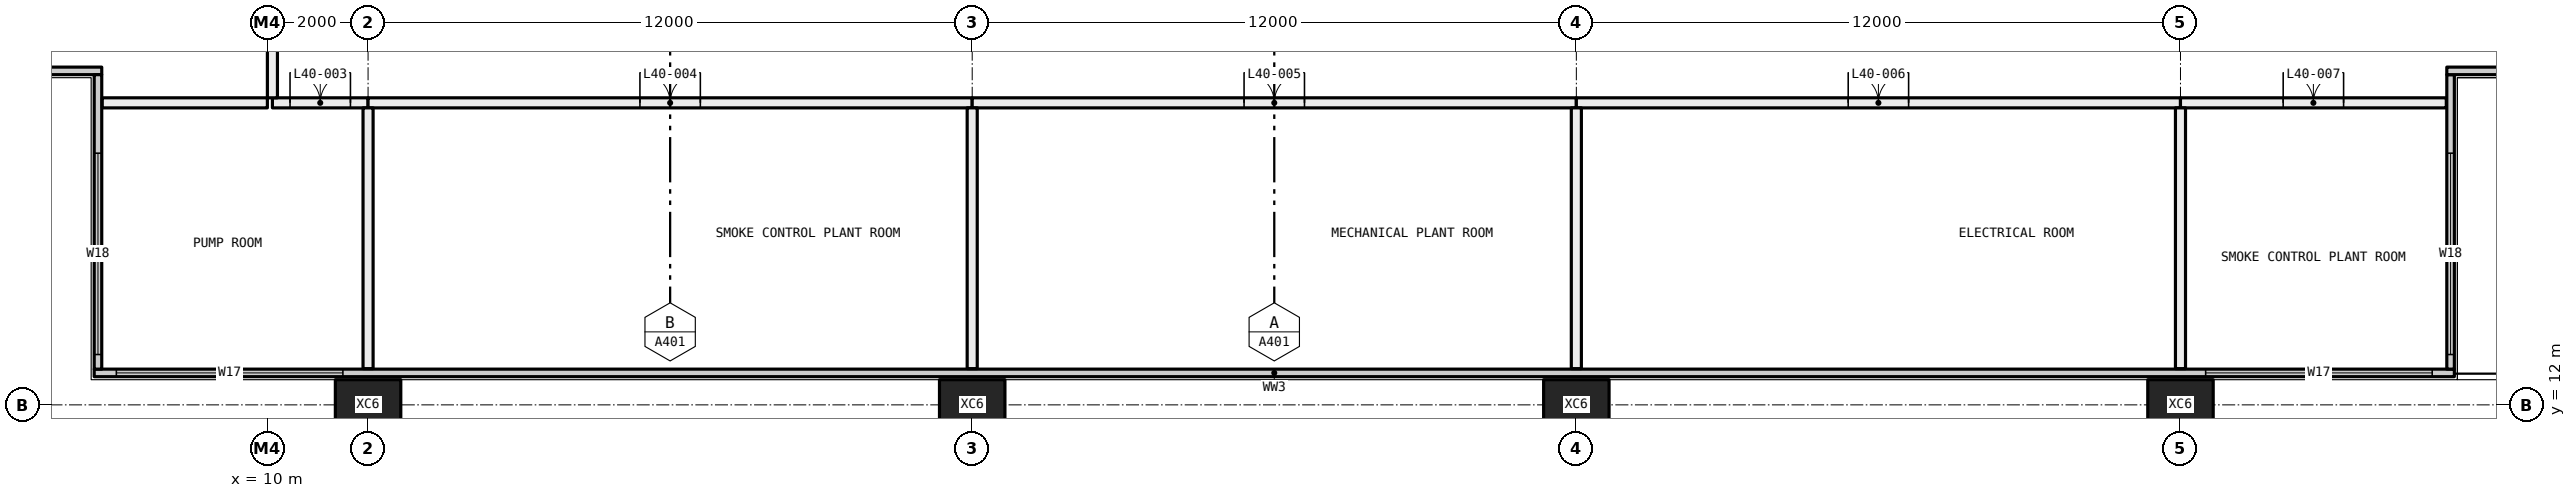
"""IFC4 building model, lengths in metres.
Left out: names, types, materials, properties, quantities, classifications, styles, units other than length and angle.
Written with IfcOpenShell. Run it as: python <this file> out.ifc"""

import sys

from ifc_helpers import new_model, si_unit, direction, frame, frame_2d, origin, origin_2d, place, context, subcontext, project, spatial, rectangle, hollow_rectangle, extrude, element, fill, save


model = new_model("IFC4")
c1 = context("Model", 3, precision=1e-05, world=origin(), true_north=direction((0.0, 1.0)))
c2 = subcontext(c1, "Body", "Model", "MODEL_VIEW")
j1 = project(units=[si_unit("LENGTHUNIT", "METRE"), si_unit("PLANEANGLEUNIT", "RADIAN")], contexts=[c1])
p1 = place(None, origin())
s1 = spatial("IfcSite", under=j1, at=p1, CompositionType="ELEMENT")
p2 = place(p1, origin())
s2 = spatial("IfcBuilding", under=s1, at=p2, CompositionType="ELEMENT")
p3 = place(p2, frame((0.0, 0.0, 153.75)))
s3 = spatial("IfcBuildingStorey", under=s2, at=p3, CompositionType="ELEMENT", Elevation=153.75)
for number, where, z_axis, x_axis in (
    (1, (12.0, 12.0, -0.4), (0.0, 0.0, 1.0), (1.0, 0.0, 0.0)),
    (2, (24.0, 12.0, -0.4), (0.0, 0.0, 1.0), (1.0, 0.0, 0.0)),
    (3, (36.0, 12.0, -0.4), (0.0, 0.0, 1.0), (1.0, 0.0, 0.0)),
    (4, (48.0, 12.0, -0.4), (0.0, 0.0, 1.0), (1.0, 0.0, 0.0)),
):
    element("IfcColumn", number, at=place(p3, frame(where, z_axis=z_axis, x_axis=x_axis)), inside=s3, PredefinedType="COLUMN", context=c2, shape_type="SweptSolid", body=[
        extrude(hollow_rectangle(XDim=1.3, YDim=1.0, WallThickness=0.05, at=origin_2d()), origin(), (0.0, 0.0, 1.0), 4.5),
    ])
p4 = place(p3, frame((6.56, 12.635, 0.0), z_axis=(0.0, 0.0, 1.0), x_axis=(1.0, 0.0, 0.0)))
e5 = element("IfcWall", 5, at=p4, inside=s3, PredefinedType="ELEMENTEDWALL", context=c2, shape_type="SweptSolid", body=[
    extrude(rectangle(XDim=46.88, YDim=0.15, at=frame_2d((23.44, 0.0))), origin(), (0.0, 0.0, 1.0), 4.1),
])
p5 = place(p4, frame((0.44, 0.0, 0.45)))
e6 = element("IfcOpeningElement", 6, at=p5, cuts=e5, PredefinedType="OPENING", context=c2, shape_type="SweptSolid", body=[
    extrude(rectangle(XDim=4.5, YDim=3.6, at=frame_2d((2.25, 1.8))), frame((0.0, 0.085, 0.0), z_axis=(0.0, -1.0, 0.0), x_axis=(1.0, 0.0, 0.0)), (0.0, 0.0, 1.0), 0.17),
])
p6 = place(p4, frame((41.94, 0.0, 0.45)))
e7 = element("IfcOpeningElement", 7, at=p6, cuts=e5, PredefinedType="OPENING", context=c2, shape_type="SweptSolid", body=[
    extrude(rectangle(XDim=4.5, YDim=3.6, at=frame_2d((2.25, 1.8))), frame((0.0, 0.085, 0.0), z_axis=(0.0, -1.0, 0.0), x_axis=(1.0, 0.0, 0.0)), (0.0, 0.0, 1.0), 0.17),
])
p7 = place(p3, frame((53.365, 12.71, 0.0), z_axis=(0.0, 0.0, 1.0), x_axis=(0.0, 1.0, 0.0)))
e8 = element("IfcWall", 8, at=p7, inside=s3, PredefinedType="ELEMENTEDWALL", context=c2, shape_type="SweptSolid", body=[
    extrude(rectangle(XDim=5.85, YDim=0.15, at=frame_2d((2.925, 0.0))), origin(), (0.0, 0.0, 1.0), 4.1),
])
p8 = place(p7, frame((0.29, 0.0, 0.45)))
e9 = element("IfcOpeningElement", 9, at=p8, cuts=e8, PredefinedType="OPENING", context=c2, shape_type="SweptSolid", body=[
    extrude(rectangle(XDim=4.0, YDim=3.6, at=frame_2d((2.0, 1.8))), frame((0.0, 0.085, 0.0), z_axis=(0.0, -1.0, 0.0), x_axis=(1.0, 0.0, 0.0)), (0.0, 0.0, 1.0), 0.17),
])
p9 = place(p3, frame((53.29, 18.635, 0.0), z_axis=(0.0, 0.0, 1.0), x_axis=(1.0, 0.0, 0.0)))
e10 = element("IfcWall", 10, at=p9, inside=s3, PredefinedType="ELEMENTEDWALL", context=c2, shape_type="SweptSolid", body=[
    extrude(rectangle(XDim=6.15, YDim=0.15, at=frame_2d((3.075, 0.0))), origin(), (0.0, 0.0, 1.0), 4.1),
])
p10 = place(p9, frame((1.71, 0.0, 0.45)))
e11 = element("IfcOpeningElement", 11, at=p10, cuts=e10, PredefinedType="OPENING", context=c2, shape_type="SweptSolid", body=[
    extrude(rectangle(XDim=0.9, YDim=3.6, at=frame_2d((0.45, 1.8))), frame((0.0, 0.085, 0.0), z_axis=(0.0, -1.0, 0.0), x_axis=(1.0, 0.0, 0.0)), (0.0, 0.0, 1.0), 0.17),
])
p11 = place(p9, frame((4.81, 0.0, 0.45)))
e12 = element("IfcOpeningElement", 12, at=p11, cuts=e10, PredefinedType="OPENING", context=c2, shape_type="SweptSolid", body=[
    extrude(rectangle(XDim=0.9, YDim=3.6, at=frame_2d((0.45, 1.8))), frame((0.0, 0.085, 0.0), z_axis=(0.0, -1.0, 0.0), x_axis=(1.0, 0.0, 0.0)), (0.0, 0.0, 1.0), 0.17),
])
p12 = place(p9, frame((2.81, 0.0, 0.0)))
e13 = element("IfcOpeningElement", 13, at=p12, cuts=e10, PredefinedType="OPENING", context=c2, shape_type="SweptSolid", body=[
    extrude(rectangle(XDim=1.8, YDim=2.4, at=frame_2d((0.9, 1.2))), frame((0.0, 0.085, 0.0), z_axis=(0.0, -1.0, 0.0), x_axis=(1.0, 0.0, 0.0)), (0.0, 0.0, 1.0), 0.17),
])
p13 = place(p3, frame((0.56, 18.635, 0.0), z_axis=(0.0, 0.0, 1.0), x_axis=(1.0, 0.0, 0.0)))
e14 = element("IfcWall", 14, at=p13, inside=s3, PredefinedType="ELEMENTEDWALL", context=c2, shape_type="SweptSolid", body=[
    extrude(rectangle(XDim=6.15, YDim=0.15, at=frame_2d((3.075, 0.0))), origin(), (0.0, 0.0, 1.0), 4.1),
])
p14 = place(p13, frame((0.44, 0.0, 0.45)))
e15 = element("IfcOpeningElement", 15, at=p14, cuts=e14, PredefinedType="OPENING", context=c2, shape_type="SweptSolid", body=[
    extrude(rectangle(XDim=4.0, YDim=3.6, at=frame_2d((2.0, 1.8))), frame((0.0, 0.085, 0.0), z_axis=(0.0, -1.0, 0.0), x_axis=(1.0, 0.0, 0.0)), (0.0, 0.0, 1.0), 0.17),
])
p15 = place(p3, frame((6.635, 12.71, 0.0), z_axis=(0.0, 0.0, 1.0), x_axis=(0.0, 1.0, 0.0)))
e16 = element("IfcWall", 16, at=p15, inside=s3, PredefinedType="ELEMENTEDWALL", context=c2, shape_type="SweptSolid", body=[
    extrude(rectangle(XDim=5.85, YDim=0.15, at=frame_2d((2.925, 0.0))), origin(), (0.0, 0.0, 1.0), 4.1),
])
p16 = place(p15, frame((0.29, 0.0, 0.45)))
e17 = element("IfcOpeningElement", 17, at=p16, cuts=e16, PredefinedType="OPENING", context=c2, shape_type="SweptSolid", body=[
    extrude(rectangle(XDim=4.0, YDim=3.6, at=frame_2d((2.0, 1.8))), frame((0.0, 0.085, 0.0), z_axis=(0.0, -1.0, 0.0), x_axis=(1.0, 0.0, 0.0)), (0.0, 0.0, 1.0), 0.17),
])
p17 = place(p3, frame((10.1, 18.0, 0.0), z_axis=(0.0, 0.0, 1.0), x_axis=(1.0, 0.0, 0.0)))
e18 = element("IfcWall", 18, at=p17, inside=s3, PredefinedType="PARTITIONING", context=c2, shape_type="SweptSolid", body=[
    extrude(rectangle(XDim=1.9, YDim=0.2, at=frame_2d((0.95, 0.0))), origin(), (0.0, 0.0, 1.0), 4.1),
])
p18 = place(p17, frame((0.35, 0.0, 0.0)))
e19 = element("IfcOpeningElement", 19, at=p18, cuts=e18, PredefinedType="OPENING", context=c2, shape_type="SweptSolid", body=[
    extrude(rectangle(XDim=1.2, YDim=2.1, at=frame_2d((0.6, 1.05))), frame((0.0, 0.11, 0.0), z_axis=(0.0, -1.0, 0.0), x_axis=(1.0, 0.0, 0.0)), (0.0, 0.0, 1.0), 0.22),
])
p19 = place(p3, frame((12.0, 18.0, 0.0), z_axis=(0.0, 0.0, 1.0), x_axis=(1.0, 0.0, 0.0)))
e20 = element("IfcWall", 20, at=p19, inside=s3, PredefinedType="PARTITIONING", context=c2, shape_type="SweptSolid", body=[
    extrude(rectangle(XDim=12.0, YDim=0.2, at=frame_2d((6.0, 0.0))), origin(), (0.0, 0.0, 1.0), 4.1),
])
p20 = place(p19, frame((5.4, 0.0, 0.0)))
e21 = element("IfcOpeningElement", 21, at=p20, cuts=e20, PredefinedType="OPENING", context=c2, shape_type="SweptSolid", body=[
    extrude(rectangle(XDim=1.2, YDim=2.1, at=frame_2d((0.6, 1.05))), frame((0.0, 0.11, 0.0), z_axis=(0.0, -1.0, 0.0), x_axis=(1.0, 0.0, 0.0)), (0.0, 0.0, 1.0), 0.22),
])
p21 = place(p3, frame((24.0, 18.0, 0.0), z_axis=(0.0, 0.0, 1.0), x_axis=(1.0, 0.0, 0.0)))
e22 = element("IfcWall", 22, at=p21, inside=s3, PredefinedType="PARTITIONING", context=c2, shape_type="SweptSolid", body=[
    extrude(rectangle(XDim=12.0, YDim=0.2, at=frame_2d((6.0, 0.0))), origin(), (0.0, 0.0, 1.0), 3.5),
])
p22 = place(p21, frame((5.4, 0.0, 0.0)))
e23 = element("IfcOpeningElement", 23, at=p22, cuts=e22, PredefinedType="OPENING", context=c2, shape_type="SweptSolid", body=[
    extrude(rectangle(XDim=1.2, YDim=2.1, at=frame_2d((0.6, 1.05))), frame((0.0, 0.11, 0.0), z_axis=(0.0, -1.0, 0.0), x_axis=(1.0, 0.0, 0.0)), (0.0, 0.0, 1.0), 0.22),
])
p23 = place(p3, frame((36.0, 18.0, 0.0), z_axis=(0.0, 0.0, 1.0), x_axis=(1.0, 0.0, 0.0)))
e24 = element("IfcWall", 24, at=p23, inside=s3, PredefinedType="PARTITIONING", context=c2, shape_type="SweptSolid", body=[
    extrude(rectangle(XDim=12.0, YDim=0.2, at=frame_2d((6.0, 0.0))), origin(), (0.0, 0.0, 1.0), 3.5),
])
p24 = place(p23, frame((5.4, 0.0, 0.0)))
e25 = element("IfcOpeningElement", 25, at=p24, cuts=e24, PredefinedType="OPENING", context=c2, shape_type="SweptSolid", body=[
    extrude(rectangle(XDim=1.2, YDim=2.1, at=frame_2d((0.6, 1.05))), frame((0.0, 0.11, 0.0), z_axis=(0.0, -1.0, 0.0), x_axis=(1.0, 0.0, 0.0)), (0.0, 0.0, 1.0), 0.22),
])
p25 = place(p3, frame((48.0, 18.0, 0.0), z_axis=(0.0, 0.0, 1.0), x_axis=(1.0, 0.0, 0.0)))
e26 = element("IfcWall", 26, at=p25, inside=s3, PredefinedType="PARTITIONING", context=c2, shape_type="SweptSolid", body=[
    extrude(rectangle(XDim=5.28, YDim=0.2, at=frame_2d((2.64, 0.0))), origin(), (0.0, 0.0, 1.0), 4.1),
])
p26 = place(p25, frame((2.04, 0.0, 0.0)))
e27 = element("IfcOpeningElement", 27, at=p26, cuts=e26, PredefinedType="OPENING", context=c2, shape_type="SweptSolid", body=[
    extrude(rectangle(XDim=1.2, YDim=2.1, at=frame_2d((0.6, 1.05))), frame((0.0, 0.11, 0.0), z_axis=(0.0, -1.0, 0.0), x_axis=(1.0, 0.0, 0.0)), (0.0, 0.0, 1.0), 0.22),
])
p27 = place(p3, frame((10.1, 24.0, 0.0), z_axis=(0.0, 0.0, 1.0), x_axis=(0.0, -1.0, 0.0)))
e28 = element("IfcWall", 28, at=p27, inside=s3, PredefinedType="PARTITIONING", context=c2, shape_type="SweptSolid", body=[
    extrude(rectangle(XDim=5.9, YDim=0.2, at=frame_2d((2.95, 0.0))), origin(), (0.0, 0.0, 1.0), 3.5),
])
p28 = place(p27, frame((2.35, 0.0, 0.0)))
e29 = element("IfcOpeningElement", 29, at=p28, cuts=e28, PredefinedType="OPENING", context=c2, shape_type="SweptSolid", body=[
    extrude(rectangle(XDim=1.2, YDim=2.1, at=frame_2d((0.6, 1.05))), frame((0.0, 0.11, 0.0), z_axis=(0.0, -1.0, 0.0), x_axis=(1.0, 0.0, 0.0)), (0.0, 0.0, 1.0), 0.22),
])
p29 = place(p3, frame((12.0, 12.72, 0.0), z_axis=(0.0, 0.0, 1.0), x_axis=(0.0, 1.0, 0.0)))
e30 = element("IfcWall", 30, at=p29, inside=s3, PredefinedType="PARTITIONING", context=c2, shape_type="SweptSolid", body=[
    extrude(rectangle(XDim=5.18, YDim=0.2, at=frame_2d((2.59, 0.0))), origin(), (0.0, 0.0, 1.0), 4.1),
])
p30 = place(p3, frame((10.0, 18.0, 0.0), z_axis=(0.0, 0.0, 1.0), x_axis=(-1.0, 0.0, 0.0)))
e31 = element("IfcWall", 31, at=p30, inside=s3, PredefinedType="PARTITIONING", context=c2, shape_type="SweptSolid", body=[
    extrude(rectangle(XDim=3.28, YDim=0.2, at=frame_2d((1.64, 0.0))), origin(), (0.0, 0.0, 1.0), 4.1),
])
p31 = place(p3, frame((24.0, 12.72, 0.0), z_axis=(0.0, 0.0, 1.0), x_axis=(0.0, 1.0, 0.0)))
e32 = element("IfcWall", 32, at=p31, inside=s3, PredefinedType="PARTITIONING", context=c2, shape_type="SweptSolid", body=[
    extrude(rectangle(XDim=5.18, YDim=0.2, at=frame_2d((2.59, 0.0))), origin(), (0.0, 0.0, 1.0), 4.1),
])
p32 = place(p3, frame((36.0, 12.72, 0.0), z_axis=(0.0, 0.0, 1.0), x_axis=(0.0, 1.0, 0.0)))
e33 = element("IfcWall", 33, at=p32, inside=s3, PredefinedType="PARTITIONING", context=c2, shape_type="SweptSolid", body=[
    extrude(rectangle(XDim=5.18, YDim=0.2, at=frame_2d((2.59, 0.0))), origin(), (0.0, 0.0, 1.0), 3.5),
])
p33 = place(p3, frame((48.0, 12.72, 0.0), z_axis=(0.0, 0.0, 1.0), x_axis=(0.0, 1.0, 0.0)))
e34 = element("IfcWall", 34, at=p33, inside=s3, PredefinedType="PARTITIONING", context=c2, shape_type="SweptSolid", body=[
    extrude(rectangle(XDim=5.18, YDim=0.2, at=frame_2d((2.59, 0.0))), origin(), (0.0, 0.0, 1.0), 4.1),
])
p34 = place(p5, origin())
e35 = element("IfcWindow", 35, at=p34, inside=s3, PartitioningType="SINGLE_PANEL", PredefinedType="WINDOW", context=c2, shape_type="SweptSolid", body=[
    extrude(rectangle(XDim=4.5, YDim=3.6, at=frame_2d((2.25, 1.8))), frame((0.0, 0.03, 0.0), z_axis=(0.0, -1.0, 0.0), x_axis=(1.0, 0.0, 0.0)), (0.0, 0.0, 1.0), 0.06),
])
fill(e6, e35)
p35 = place(p6, origin())
e36 = element("IfcWindow", 36, at=p35, inside=s3, PartitioningType="SINGLE_PANEL", PredefinedType="WINDOW", context=c2, shape_type="SweptSolid", body=[
    extrude(rectangle(XDim=4.5, YDim=3.6, at=frame_2d((2.25, 1.8))), frame((0.0, 0.03, 0.0), z_axis=(0.0, -1.0, 0.0), x_axis=(1.0, 0.0, 0.0)), (0.0, 0.0, 1.0), 0.06),
])
fill(e7, e36)
p36 = place(p8, origin())
e37 = element("IfcWindow", 37, at=p36, inside=s3, PartitioningType="SINGLE_PANEL", PredefinedType="WINDOW", context=c2, shape_type="SweptSolid", body=[
    extrude(rectangle(XDim=4.0, YDim=3.6, at=frame_2d((2.0, 1.8))), frame((0.0, 0.03, 0.0), z_axis=(0.0, -1.0, 0.0), x_axis=(1.0, 0.0, 0.0)), (0.0, 0.0, 1.0), 0.06),
])
fill(e9, e37)
p37 = place(p16, origin())
e38 = element("IfcWindow", 38, at=p37, inside=s3, PartitioningType="SINGLE_PANEL", PredefinedType="WINDOW", context=c2, shape_type="SweptSolid", body=[
    extrude(rectangle(XDim=4.0, YDim=3.6, at=frame_2d((2.0, 1.8))), frame((0.0, 0.03, 0.0), z_axis=(0.0, -1.0, 0.0), x_axis=(1.0, 0.0, 0.0)), (0.0, 0.0, 1.0), 0.06),
])
fill(e17, e38)
p38 = place(p18, origin())
e39 = element("IfcDoor", 39, at=p38, inside=s3, OperationType="DOUBLE_DOOR_SINGLE_SWING", PredefinedType="DOOR", context=c2, shape_type="SweptSolid", body=[
    extrude(rectangle(XDim=1.2, YDim=2.1, at=frame_2d((0.6, 1.05))), frame((0.0, 0.025, 0.0), z_axis=(0.0, -1.0, 0.0), x_axis=(1.0, 0.0, 0.0)), (0.0, 0.0, 1.0), 0.05),
])
fill(e19, e39)
p39 = place(p20, origin())
e40 = element("IfcDoor", 40, at=p39, inside=s3, OperationType="DOUBLE_DOOR_SINGLE_SWING", PredefinedType="DOOR", context=c2, shape_type="SweptSolid", body=[
    extrude(rectangle(XDim=1.2, YDim=2.1, at=frame_2d((0.6, 1.05))), frame((0.0, 0.025, 0.0), z_axis=(0.0, -1.0, 0.0), x_axis=(1.0, 0.0, 0.0)), (0.0, 0.0, 1.0), 0.05),
])
fill(e21, e40)
p40 = place(p22, origin())
e41 = element("IfcDoor", 41, at=p40, inside=s3, OperationType="DOUBLE_DOOR_SINGLE_SWING", PredefinedType="DOOR", context=c2, shape_type="SweptSolid", body=[
    extrude(rectangle(XDim=1.2, YDim=2.1, at=frame_2d((0.6, 1.05))), frame((0.0, 0.025, 0.0), z_axis=(0.0, -1.0, 0.0), x_axis=(1.0, 0.0, 0.0)), (0.0, 0.0, 1.0), 0.05),
])
fill(e23, e41)
p41 = place(p24, origin())
e42 = element("IfcDoor", 42, at=p41, inside=s3, OperationType="DOUBLE_DOOR_SINGLE_SWING", PredefinedType="DOOR", context=c2, shape_type="SweptSolid", body=[
    extrude(rectangle(XDim=1.2, YDim=2.1, at=frame_2d((0.6, 1.05))), frame((0.0, 0.025, 0.0), z_axis=(0.0, -1.0, 0.0), x_axis=(1.0, 0.0, 0.0)), (0.0, 0.0, 1.0), 0.05),
])
fill(e25, e42)
p42 = place(p26, origin())
e43 = element("IfcDoor", 43, at=p42, inside=s3, OperationType="DOUBLE_DOOR_SINGLE_SWING", PredefinedType="DOOR", context=c2, shape_type="SweptSolid", body=[
    extrude(rectangle(XDim=1.2, YDim=2.1, at=frame_2d((0.6, 1.05))), frame((0.0, 0.025, 0.0), z_axis=(0.0, -1.0, 0.0), x_axis=(1.0, 0.0, 0.0)), (0.0, 0.0, 1.0), 0.05),
])
fill(e27, e43)
save(model, sys.argv[1])
